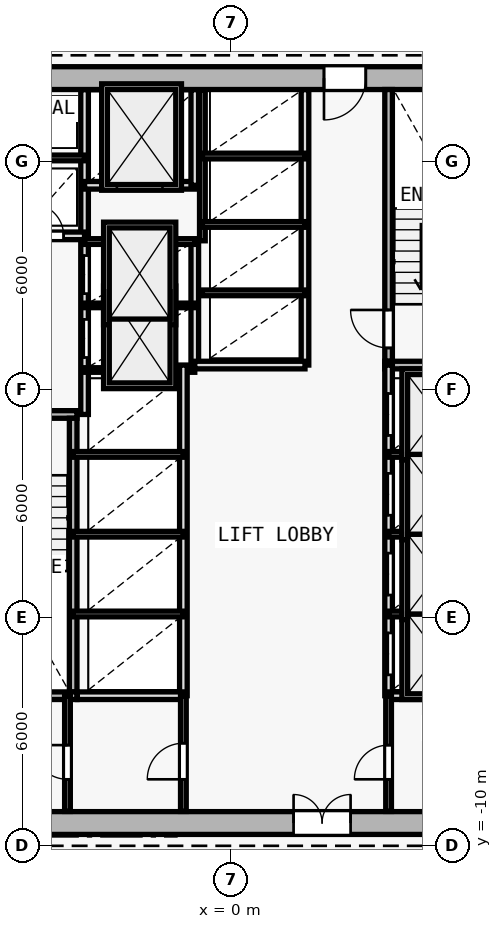
"""IFC4 building model, lengths in metres.
Left out: names, types, materials, properties, quantities, classifications, styles, units other than length and angle.
Written with IfcOpenShell. Run it as: python <this file> out.ifc"""

import sys

from ifc_helpers import new_model, si_unit, direction, frame, frame_2d, origin, origin_2d, place, context, subcontext, project, spatial, rectangle, i_section, extrude, element, fill, save


model = new_model("IFC4")
c1 = context("Model", 3, precision=1e-05, world=origin(), true_north=direction((0.0, 1.0)))
c2 = subcontext(c1, "Body", "Model", "MODEL_VIEW")
j1 = project(units=[si_unit("LENGTHUNIT", "METRE"), si_unit("PLANEANGLEUNIT", "RADIAN")], contexts=[c1])
p1 = place(None, origin())
s1 = spatial("IfcSite", under=j1, at=p1, CompositionType="ELEMENT")
p2 = place(p1, origin())
s2 = spatial("IfcBuilding", under=s1, at=p2, CompositionType="ELEMENT")
p3 = place(p2, frame((0.0, 0.0, 58.8)))
s3 = spatial("IfcBuildingStorey", under=s2, at=p3, CompositionType="ELEMENT", Elevation=58.8)
p4 = place(p3, frame((0.0, -9.4, 0.0), z_axis=(0.0, 0.0, 1.0), x_axis=(1.0, 0.0, 0.0)))
e1 = element("IfcColumn", 1, at=p4, inside=s3, PredefinedType="COLUMN", context=c2, shape_type="SweptSolid", body=[
    extrude(i_section(OverallWidth=0.416, OverallDepth=0.446, WebThickness=0.025, FlangeThickness=0.04, FilletRadius=0.015, at=origin_2d()), origin(), (0.0, 0.0, 1.0), 3.6),
])
p5 = place(p3, frame((-8.0, -9.4, 0.0), z_axis=(0.0, 0.0, 1.0), x_axis=(1.0, 0.0, 0.0)))
e2 = element("IfcWall", 2, at=p5, inside=s3, PredefinedType="SHEAR", context=c2, shape_type="SweptSolid", body=[
    extrude(rectangle(XDim=16.0, YDim=0.6, at=frame_2d((8.0, 0.0))), origin(), (0.0, 0.0, 1.0), 3.35),
])
p6 = place(p5, frame((9.65, 0.0, 0.0)))
e3 = element("IfcOpeningElement", 3, at=p6, cuts=e2, PredefinedType="OPENING", context=c2, shape_type="SweptSolid", body=[
    extrude(rectangle(XDim=1.5, YDim=2.2, at=frame_2d((0.75, 1.1))), frame((0.0, 0.31, 0.0), z_axis=(0.0, -1.0, 0.0), x_axis=(1.0, 0.0, 0.0)), (0.0, 0.0, 1.0), 0.62),
])
p7 = place(p3, frame((8.0, 10.2, 0.0), z_axis=(0.0, 0.0, 1.0), x_axis=(-1.0, 0.0, 0.0)))
e4 = element("IfcWall", 4, at=p7, inside=s3, PredefinedType="SHEAR", context=c2, shape_type="SweptSolid", body=[
    extrude(rectangle(XDim=16.0, YDim=0.6, at=frame_2d((8.0, 0.0))), origin(), (0.0, 0.0, 1.0), 3.35),
])
p8 = place(p7, frame((4.45, 0.0, 0.0)))
e5 = element("IfcOpeningElement", 5, at=p8, cuts=e4, PredefinedType="OPENING", context=c2, shape_type="SweptSolid", body=[
    extrude(rectangle(XDim=1.1, YDim=2.15, at=frame_2d((0.55, 1.075))), frame((0.0, 0.31, 0.0), z_axis=(0.0, -1.0, 0.0), x_axis=(1.0, 0.0, 0.0)), (0.0, 0.0, 1.0), 0.62),
])
p9 = place(p3, frame((-7.4, 1.35, 0.0), z_axis=(0.0, 0.0, 1.0), x_axis=(1.0, 0.0, 0.0)))
e6 = element("IfcWall", 6, at=p9, inside=s3, PredefinedType="SOLIDWALL", context=c2, shape_type="SweptSolid", body=[
    extrude(rectangle(XDim=3.35, YDim=0.2, at=frame_2d((1.675, 0.0))), origin(), (0.0, 0.0, 1.0), 3.35),
])
p10 = place(p9, frame((0.65, 0.0, 0.0)))
e7 = element("IfcOpeningElement", 7, at=p10, cuts=e6, PredefinedType="OPENING", context=c2, shape_type="SweptSolid", body=[
    extrude(rectangle(XDim=1.0, YDim=2.15, at=frame_2d((0.5, 1.075))), frame((0.0, 0.11, 0.0), z_axis=(0.0, -1.0, 0.0), x_axis=(1.0, 0.0, 0.0)), (0.0, 0.0, 1.0), 0.22),
])
p11 = place(p3, frame((-4.15, -5.95, 0.0), z_axis=(0.0, 0.0, 1.0), x_axis=(0.0, 1.0, 0.0)))
e8 = element("IfcWall", 8, at=p11, inside=s3, PredefinedType="SOLIDWALL", context=c2, shape_type="SweptSolid", body=[
    extrude(rectangle(XDim=7.2, YDim=0.2, at=frame_2d((3.6, 0.0))), origin(), (0.0, 0.0, 1.0), 3.35),
])
p12 = place(p3, frame((-3.85, 1.35, 0.0), z_axis=(0.0, 0.0, 1.0), x_axis=(0.0, 1.0, 0.0)))
e9 = element("IfcWall", 9, at=p12, inside=s3, PredefinedType="SOLIDWALL", context=c2, shape_type="SweptSolid", body=[
    extrude(rectangle(XDim=8.545, YDim=0.2, at=frame_2d((4.272, 0.0))), origin(), (0.0, 0.0, 1.0), 3.35),
])
p13 = place(p12, frame((1.5, 0.0, 0.0)))
e10 = element("IfcOpeningElement", 10, at=p13, cuts=e9, PredefinedType="OPENING", context=c2, shape_type="SweptSolid", body=[
    extrude(rectangle(XDim=1.0, YDim=2.15, at=frame_2d((0.5, 1.075))), frame((0.0, 0.11, 0.0), z_axis=(0.0, -1.0, 0.0), x_axis=(1.0, 0.0, 0.0)), (0.0, 0.0, 1.0), 0.22),
])
p14 = place(p12, frame((3.18, 0.0, 0.0)))
e11 = element("IfcOpeningElement", 11, at=p14, cuts=e9, PredefinedType="OPENING", context=c2, shape_type="SweptSolid", body=[
    extrude(rectangle(XDim=1.0, YDim=2.15, at=frame_2d((0.5, 1.075))), frame((0.0, 0.11, 0.0), z_axis=(0.0, -1.0, 0.0), x_axis=(1.0, 0.0, 0.0)), (0.0, 0.0, 1.0), 0.22),
])
p15 = place(p3, frame((-7.395, 6.05, 0.0), z_axis=(0.0, 0.0, 1.0), x_axis=(1.0, 0.0, 0.0)))
e12 = element("IfcWall", 12, at=p15, inside=s3, PredefinedType="SOLIDWALL", context=c2, shape_type="SweptSolid", body=[
    extrude(rectangle(XDim=3.545, YDim=0.2, at=frame_2d((1.772, 0.0))), origin(), (0.0, 0.0, 1.0), 3.35),
])
p16 = place(p15, frame((0.345, 0.0, 0.0)))
e13 = element("IfcOpeningElement", 13, at=p16, cuts=e12, PredefinedType="OPENING", context=c2, shape_type="SweptSolid", body=[
    extrude(rectangle(XDim=0.85, YDim=2.1, at=frame_2d((0.425, 1.05))), frame((0.0, 0.11, 0.0), z_axis=(0.0, -1.0, 0.0), x_axis=(1.0, 0.0, 0.0)), (0.0, 0.0, 1.0), 0.22),
])
p17 = place(p15, frame((2.145, 0.0, 0.0)))
e14 = element("IfcOpeningElement", 14, at=p17, cuts=e12, PredefinedType="OPENING", context=c2, shape_type="SweptSolid", body=[
    extrude(rectangle(XDim=0.85, YDim=2.1, at=frame_2d((0.425, 1.05))), frame((0.0, 0.11, 0.0), z_axis=(0.0, -1.0, 0.0), x_axis=(1.0, 0.0, 0.0)), (0.0, 0.0, 1.0), 0.22),
])
p18 = place(p3, frame((-7.395, 8.1, 0.0), z_axis=(0.0, 0.0, 1.0), x_axis=(1.0, 0.0, 0.0)))
e15 = element("IfcWall", 15, at=p18, inside=s3, PredefinedType="PARTITIONING", context=c2, shape_type="SweptSolid", body=[
    extrude(rectangle(XDim=3.545, YDim=0.15, at=frame_2d((1.772, 0.0))), origin(), (0.0, 0.0, 1.0), 3.35),
])
p19 = place(p3, frame((4.15, 2.75, 0.0), z_axis=(0.0, 0.0, 1.0), x_axis=(0.0, 1.0, 0.0)))
e16 = element("IfcWall", 16, at=p19, inside=s3, PredefinedType="SOLIDWALL", context=c2, shape_type="SweptSolid", body=[
    extrude(rectangle(XDim=7.15, YDim=0.2, at=frame_2d((3.575, 0.0))), origin(), (0.0, 0.0, 1.0), 3.35),
])
p20 = place(p19, frame((0.35, 0.0, 0.0)))
e17 = element("IfcOpeningElement", 17, at=p20, cuts=e16, PredefinedType="OPENING", context=c2, shape_type="SweptSolid", body=[
    extrude(rectangle(XDim=1.0, YDim=2.15, at=frame_2d((0.5, 1.075))), frame((0.0, 0.11, 0.0), z_axis=(0.0, -1.0, 0.0), x_axis=(1.0, 0.0, 0.0)), (0.0, 0.0, 1.0), 0.22),
])
p21 = place(p3, frame((4.05, 2.65, 0.0), z_axis=(0.0, 0.0, 1.0), x_axis=(1.0, 0.0, 0.0)))
e18 = element("IfcWall", 18, at=p21, inside=s3, PredefinedType="SOLIDWALL", context=c2, shape_type="SweptSolid", body=[
    extrude(rectangle(XDim=3.35, YDim=0.2, at=frame_2d((1.675, 0.0))), origin(), (0.0, 0.0, 1.0), 3.35),
])
p22 = place(p3, frame((-0.95, 2.65, 0.0), z_axis=(0.0, 0.0, 1.0), x_axis=(0.0, 1.0, 0.0)))
e19 = element("IfcWall", 19, at=p22, inside=s3, PredefinedType="SOLIDWALL", context=c2, shape_type="SweptSolid", body=[
    extrude(rectangle(XDim=3.27, YDim=0.2, at=frame_2d((1.635, 0.0))), origin(), (0.0, 0.0, 1.0), 3.35),
])
for number, where, z_axis, x_axis in (
    (20, (-3.85, 2.52, 0.0), (0.0, 0.0, 1.0), (1.0, 0.0, 0.0)),
    (21, (-3.85, 4.22, 0.0), (0.0, 0.0, 1.0), (1.0, 0.0, 0.0)),
):
    element("IfcWall", number, at=place(p3, frame(where, z_axis=z_axis, x_axis=x_axis)), inside=s3, PredefinedType="PARTITIONING", context=c2, shape_type="SweptSolid", body=[
        extrude(rectangle(XDim=2.9, YDim=0.12, at=frame_2d((1.45, 0.0))), origin(), (0.0, 0.0, 1.0), 3.35),
    ])
p23 = place(p3, frame((-3.85, 5.9, 0.0), z_axis=(0.0, 0.0, 1.0), x_axis=(1.0, 0.0, 0.0)))
e22 = element("IfcWall", 22, at=p23, inside=s3, PredefinedType="PARTITIONING", context=c2, shape_type="SweptSolid", body=[
    extrude(rectangle(XDim=2.9, YDim=0.15, at=frame_2d((1.45, 0.0))), origin(), (0.0, 0.0, 1.0), 3.35),
])
p24 = place(p3, frame((-3.85, 7.38, 0.0), z_axis=(0.0, 0.0, 1.0), x_axis=(1.0, 0.0, 0.0)))
e23 = element("IfcWall", 23, at=p24, inside=s3, PredefinedType="SOLIDWALL", context=c2, shape_type="SweptSolid", body=[
    extrude(rectangle(XDim=2.9, YDim=0.2, at=frame_2d((1.45, 0.0))), origin(), (0.0, 0.0, 1.0), 3.35),
])
p25 = place(p24, frame((0.85, 0.0, 0.0)))
e24 = element("IfcOpeningElement", 24, at=p25, cuts=e23, PredefinedType="OPENING", context=c2, shape_type="SweptSolid", body=[
    extrude(rectangle(XDim=1.2, YDim=2.2, at=frame_2d((0.6, 1.1))), frame((0.0, 0.11, 0.0), z_axis=(0.0, -1.0, 0.0), x_axis=(1.0, 0.0, 0.0)), (0.0, 0.0, 1.0), 0.22),
])
p26 = place(p3, frame((-0.95, 7.38, 0.0), z_axis=(0.0, 0.0, 1.0), x_axis=(0.0, 1.0, 0.0)))
e25 = element("IfcWall", 25, at=p26, inside=s3, PredefinedType="SOLIDWALL", context=c2, shape_type="SweptSolid", body=[
    extrude(rectangle(XDim=2.515, YDim=0.2, at=frame_2d((1.258, 0.0))), origin(), (0.0, 0.0, 1.0), 3.35),
])
p27 = place(p3, frame((4.15, -6.05, 0.0), z_axis=(0.0, 0.0, 1.0), x_axis=(0.0, 1.0, 0.0)))
e26 = element("IfcWall", 26, at=p27, inside=s3, PredefinedType="SOLIDWALL", context=c2, shape_type="SweptSolid", body=[
    extrude(rectangle(XDim=8.7, YDim=0.2, at=frame_2d((4.35, 0.0))), origin(), (0.0, 0.0, 1.0), 3.35),
])
p28 = place(p27, frame((0.55, 0.0, 0.0)))
e27 = element("IfcOpeningElement", 27, at=p28, cuts=e26, PredefinedType="OPENING", context=c2, shape_type="SweptSolid", body=[
    extrude(rectangle(XDim=1.1, YDim=2.15, at=frame_2d((0.55, 1.075))), frame((0.0, 0.11, 0.0), z_axis=(0.0, -1.0, 0.0), x_axis=(1.0, 0.0, 0.0)), (0.0, 0.0, 1.0), 0.22),
])
p29 = place(p27, frame((2.65, 0.0, 0.0)))
e28 = element("IfcOpeningElement", 28, at=p29, cuts=e26, PredefinedType="OPENING", context=c2, shape_type="SweptSolid", body=[
    extrude(rectangle(XDim=1.1, YDim=2.15, at=frame_2d((0.55, 1.075))), frame((0.0, 0.11, 0.0), z_axis=(0.0, -1.0, 0.0), x_axis=(1.0, 0.0, 0.0)), (0.0, 0.0, 1.0), 0.22),
])
p30 = place(p27, frame((4.75, 0.0, 0.0)))
e29 = element("IfcOpeningElement", 29, at=p30, cuts=e26, PredefinedType="OPENING", context=c2, shape_type="SweptSolid", body=[
    extrude(rectangle(XDim=1.1, YDim=2.15, at=frame_2d((0.55, 1.075))), frame((0.0, 0.11, 0.0), z_axis=(0.0, -1.0, 0.0), x_axis=(1.0, 0.0, 0.0)), (0.0, 0.0, 1.0), 0.22),
])
p31 = place(p27, frame((6.85, 0.0, 0.0)))
e30 = element("IfcOpeningElement", 30, at=p31, cuts=e26, PredefinedType="OPENING", context=c2, shape_type="SweptSolid", body=[
    extrude(rectangle(XDim=1.1, YDim=2.15, at=frame_2d((0.55, 1.075))), frame((0.0, 0.11, 0.0), z_axis=(0.0, -1.0, 0.0), x_axis=(1.0, 0.0, 0.0)), (0.0, 0.0, 1.0), 0.22),
])
for number, where, z_axis, x_axis in (
    (31, (4.15, -3.9, 0.0), (0.0, 0.0, 1.0), (1.0, 0.0, 0.0)),
    (32, (4.15, -1.8, 0.0), (0.0, 0.0, 1.0), (1.0, 0.0, 0.0)),
    (33, (4.15, 0.3, 0.0), (0.0, 0.0, 1.0), (1.0, 0.0, 0.0)),
):
    element("IfcWall", number, at=place(p3, frame(where, z_axis=z_axis, x_axis=x_axis)), inside=s3, PredefinedType="PARTITIONING", context=c2, shape_type="SweptSolid", body=[
        extrude(rectangle(XDim=2.6, YDim=0.15, at=frame_2d((1.3, 0.0))), origin(), (0.0, 0.0, 1.0), 3.35),
    ])
p32 = place(p3, frame((-1.25, -6.05, 0.0), z_axis=(0.0, 0.0, 1.0), x_axis=(0.0, 1.0, 0.0)))
e34 = element("IfcWall", 34, at=p32, inside=s3, PredefinedType="SOLIDWALL", context=c2, shape_type="SweptSolid", body=[
    extrude(rectangle(XDim=8.7, YDim=0.2, at=frame_2d((4.35, 0.0))), origin(), (0.0, 0.0, 1.0), 3.35),
])
for number, where, z_axis, x_axis in (
    (35, (-4.15, -3.9, 0.0), (0.0, 0.0, 1.0), (1.0, 0.0, 0.0)),
    (36, (-4.15, -1.8, 0.0), (0.0, 0.0, 1.0), (1.0, 0.0, 0.0)),
    (37, (-4.15, 0.3, 0.0), (0.0, 0.0, 1.0), (1.0, 0.0, 0.0)),
):
    element("IfcWall", number, at=place(p3, frame(where, z_axis=z_axis, x_axis=x_axis)), inside=s3, PredefinedType="PARTITIONING", context=c2, shape_type="SweptSolid", body=[
        extrude(rectangle(XDim=2.9, YDim=0.15, at=frame_2d((1.45, 0.0))), origin(), (0.0, 0.0, 1.0), 3.35),
    ])
p33 = place(p3, frame((1.95, 2.65, 0.0), z_axis=(0.0, 0.0, 1.0), x_axis=(0.0, 1.0, 0.0)))
e38 = element("IfcWall", 38, at=p33, inside=s3, PredefinedType="SOLIDWALL", context=c2, shape_type="SweptSolid", body=[
    extrude(rectangle(XDim=7.245, YDim=0.2, at=frame_2d((3.623, 0.0))), origin(), (0.0, 0.0, 1.0), 3.35),
])
p34 = place(p3, frame((-0.95, 2.65, 0.0), z_axis=(0.0, 0.0, 1.0), x_axis=(1.0, 0.0, 0.0)))
e39 = element("IfcWall", 39, at=p34, inside=s3, PredefinedType="SOLIDWALL", context=c2, shape_type="SweptSolid", body=[
    extrude(rectangle(XDim=2.9, YDim=0.2, at=frame_2d((1.45, 0.0))), origin(), (0.0, 0.0, 1.0), 3.35),
])
p35 = place(p3, frame((-0.75, 5.92, 0.0), z_axis=(0.0, 0.0, 1.0), x_axis=(0.0, 1.0, 0.0)))
e40 = element("IfcWall", 40, at=p35, inside=s3, PredefinedType="PARTITIONING", context=c2, shape_type="SweptSolid", body=[
    extrude(rectangle(XDim=3.975, YDim=0.15, at=frame_2d((1.988, 0.0))), origin(), (0.0, 0.0, 1.0), 3.35),
])
for number, where, z_axis, x_axis in (
    (41, (-0.75, 4.55, 0.0), (0.0, 0.0, 1.0), (1.0, 0.0, 0.0)),
    (42, (-0.75, 6.35, 0.0), (0.0, 0.0, 1.0), (1.0, 0.0, 0.0)),
    (43, (-0.75, 8.15, 0.0), (0.0, 0.0, 1.0), (1.0, 0.0, 0.0)),
):
    element("IfcWall", number, at=place(p3, frame(where, z_axis=z_axis, x_axis=x_axis)), inside=s3, PredefinedType="PARTITIONING", context=c2, shape_type="SweptSolid", body=[
        extrude(rectangle(XDim=2.7, YDim=0.15, at=frame_2d((1.35, 0.0))), origin(), (0.0, 0.0, 1.0), 3.35),
    ])
p36 = place(p3, frame((-7.4, -6.05, 0.0), z_axis=(0.0, 0.0, 1.0), x_axis=(1.0, 0.0, 0.0)))
e44 = element("IfcWall", 44, at=p36, inside=s3, PredefinedType="SOLIDWALL", context=c2, shape_type="SweptSolid", body=[
    extrude(rectangle(XDim=3.35, YDim=0.2, at=frame_2d((1.675, 0.0))), origin(), (0.0, 0.0, 1.0), 3.35),
])
p37 = place(p3, frame((-4.04, -6.05, 0.0), z_axis=(0.0, 0.0, 1.0), x_axis=(1.0, 0.0, 0.0)))
e45 = element("IfcWall", 45, at=p37, inside=s3, PredefinedType="SOLIDWALL", context=c2, shape_type="SweptSolid", body=[
    extrude(rectangle(XDim=2.79, YDim=0.2, at=frame_2d((1.395, 0.0))), origin(), (0.0, 0.0, 1.0), 3.35),
])
p38 = place(p3, frame((4.15, -6.05, 0.0), z_axis=(0.0, 0.0, 1.0), x_axis=(1.0, 0.0, 0.0)))
e46 = element("IfcWall", 46, at=p38, inside=s3, PredefinedType="SOLIDWALL", context=c2, shape_type="SweptSolid", body=[
    extrude(rectangle(XDim=3.245, YDim=0.2, at=frame_2d((1.623, 0.0))), origin(), (0.0, 0.0, 1.0), 3.35),
])
p39 = place(p3, frame((-1.25, -9.095, 0.0), z_axis=(0.0, 0.0, 1.0), x_axis=(0.0, 1.0, 0.0)))
e47 = element("IfcWall", 47, at=p39, inside=s3, PredefinedType="PARTITIONING", context=c2, shape_type="SweptSolid", body=[
    extrude(rectangle(XDim=3.045, YDim=0.15, at=frame_2d((1.522, 0.0))), origin(), (0.0, 0.0, 1.0), 3.35),
])
p40 = place(p39, frame((0.845, 0.0, 0.0)))
e48 = element("IfcOpeningElement", 48, at=p40, cuts=e47, PredefinedType="OPENING", context=c2, shape_type="SweptSolid", body=[
    extrude(rectangle(XDim=0.95, YDim=2.1, at=frame_2d((0.475, 1.05))), frame((0.0, 0.085, 0.0), z_axis=(0.0, -1.0, 0.0), x_axis=(1.0, 0.0, 0.0)), (0.0, 0.0, 1.0), 0.17),
])
p41 = place(p3, frame((4.15, -9.095, 0.0), z_axis=(0.0, 0.0, 1.0), x_axis=(0.0, 1.0, 0.0)))
e49 = element("IfcWall", 49, at=p41, inside=s3, PredefinedType="PARTITIONING", context=c2, shape_type="SweptSolid", body=[
    extrude(rectangle(XDim=3.045, YDim=0.15, at=frame_2d((1.522, 0.0))), origin(), (0.0, 0.0, 1.0), 3.35),
])
p42 = place(p41, frame((0.845, 0.0, 0.0)))
e50 = element("IfcOpeningElement", 50, at=p42, cuts=e49, PredefinedType="OPENING", context=c2, shape_type="SweptSolid", body=[
    extrude(rectangle(XDim=0.9, YDim=2.1, at=frame_2d((0.45, 1.05))), frame((0.0, 0.085, 0.0), z_axis=(0.0, -1.0, 0.0), x_axis=(1.0, 0.0, 0.0)), (0.0, 0.0, 1.0), 0.17),
])
p43 = place(p3, frame((-4.3, -9.095, 0.0), z_axis=(0.0, 0.0, 1.0), x_axis=(0.0, 1.0, 0.0)))
e51 = element("IfcWall", 51, at=p43, inside=s3, PredefinedType="PARTITIONING", context=c2, shape_type="SweptSolid", body=[
    extrude(rectangle(XDim=3.045, YDim=0.15, at=frame_2d((1.522, 0.0))), origin(), (0.0, 0.0, 1.0), 3.35),
])
p44 = place(p43, frame((0.845, 0.0, 0.0)))
e52 = element("IfcOpeningElement", 52, at=p44, cuts=e51, PredefinedType="OPENING", context=c2, shape_type="SweptSolid", body=[
    extrude(rectangle(XDim=0.9, YDim=2.1, at=frame_2d((0.45, 1.05))), frame((0.0, 0.085, 0.0), z_axis=(0.0, -1.0, 0.0), x_axis=(1.0, 0.0, 0.0)), (0.0, 0.0, 1.0), 0.17),
])
p45 = place(p6, origin())
e53 = element("IfcDoor", 53, at=p45, inside=s3, OperationType="DOUBLE_DOOR_SINGLE_SWING", PredefinedType="DOOR", context=c2, shape_type="SweptSolid", body=[
    extrude(rectangle(XDim=1.5, YDim=2.2, at=frame_2d((0.75, 1.1))), frame((0.0, 0.025, 0.0), z_axis=(0.0, -1.0, 0.0), x_axis=(1.0, 0.0, 0.0)), (0.0, 0.0, 1.0), 0.05),
])
fill(e3, e53)
p46 = place(p8, origin())
e54 = element("IfcDoor", 54, at=p46, inside=s3, OperationType="SINGLE_SWING_RIGHT", PredefinedType="DOOR", context=c2, shape_type="SweptSolid", body=[
    extrude(rectangle(XDim=1.1, YDim=2.15, at=frame_2d((0.55, 1.075))), frame((0.0, 0.025, 0.0), z_axis=(0.0, -1.0, 0.0), x_axis=(1.0, 0.0, 0.0)), (0.0, 0.0, 1.0), 0.05),
])
fill(e5, e54)
p47 = place(p17, origin())
e55 = element("IfcDoor", 55, at=p47, inside=s3, OperationType="SINGLE_SWING_LEFT", PredefinedType="DOOR", context=c2, shape_type="SweptSolid", body=[
    extrude(rectangle(XDim=0.85, YDim=2.1, at=frame_2d((0.425, 1.05))), frame((0.0, 0.025, 0.0), z_axis=(0.0, -1.0, 0.0), x_axis=(1.0, 0.0, 0.0)), (0.0, 0.0, 1.0), 0.05),
])
fill(e14, e55)
p48 = place(p20, origin())
e56 = element("IfcDoor", 56, at=p48, inside=s3, OperationType="SINGLE_SWING_RIGHT", PredefinedType="DOOR", context=c2, shape_type="SweptSolid", body=[
    extrude(rectangle(XDim=1.0, YDim=2.15, at=frame_2d((0.5, 1.075))), frame((0.0, 0.025, 0.0), z_axis=(0.0, -1.0, 0.0), x_axis=(1.0, 0.0, 0.0)), (0.0, 0.0, 1.0), 0.05),
])
fill(e17, e56)
p49 = place(p25, origin())
e57 = element("IfcDoor", 57, at=p49, inside=s3, OperationType="DOUBLE_DOOR_SLIDING", PredefinedType="DOOR", context=c2, shape_type="SweptSolid", body=[
    extrude(rectangle(XDim=1.2, YDim=2.2, at=frame_2d((0.6, 1.1))), frame((0.0, 0.025, 0.0), z_axis=(0.0, -1.0, 0.0), x_axis=(1.0, 0.0, 0.0)), (0.0, 0.0, 1.0), 0.05),
])
fill(e24, e57)
p50 = place(p28, origin())
e58 = element("IfcDoor", 58, at=p50, inside=s3, OperationType="DOUBLE_DOOR_SLIDING", PredefinedType="DOOR", context=c2, shape_type="SweptSolid", body=[
    extrude(rectangle(XDim=1.1, YDim=2.15, at=frame_2d((0.55, 1.075))), frame((0.0, 0.025, 0.0), z_axis=(0.0, -1.0, 0.0), x_axis=(1.0, 0.0, 0.0)), (0.0, 0.0, 1.0), 0.05),
])
fill(e27, e58)
p51 = place(p29, origin())
e59 = element("IfcDoor", 59, at=p51, inside=s3, OperationType="DOUBLE_DOOR_SLIDING", PredefinedType="DOOR", context=c2, shape_type="SweptSolid", body=[
    extrude(rectangle(XDim=1.1, YDim=2.15, at=frame_2d((0.55, 1.075))), frame((0.0, 0.025, 0.0), z_axis=(0.0, -1.0, 0.0), x_axis=(1.0, 0.0, 0.0)), (0.0, 0.0, 1.0), 0.05),
])
fill(e28, e59)
p52 = place(p30, origin())
e60 = element("IfcDoor", 60, at=p52, inside=s3, OperationType="DOUBLE_DOOR_SLIDING", PredefinedType="DOOR", context=c2, shape_type="SweptSolid", body=[
    extrude(rectangle(XDim=1.1, YDim=2.15, at=frame_2d((0.55, 1.075))), frame((0.0, 0.025, 0.0), z_axis=(0.0, -1.0, 0.0), x_axis=(1.0, 0.0, 0.0)), (0.0, 0.0, 1.0), 0.05),
])
fill(e29, e60)
p53 = place(p31, origin())
e61 = element("IfcDoor", 61, at=p53, inside=s3, OperationType="DOUBLE_DOOR_SLIDING", PredefinedType="DOOR", context=c2, shape_type="SweptSolid", body=[
    extrude(rectangle(XDim=1.1, YDim=2.15, at=frame_2d((0.55, 1.075))), frame((0.0, 0.025, 0.0), z_axis=(0.0, -1.0, 0.0), x_axis=(1.0, 0.0, 0.0)), (0.0, 0.0, 1.0), 0.05),
])
fill(e30, e61)
p54 = place(p13, origin())
e62 = element("IfcDoor", 62, at=p54, inside=s3, OperationType="DOUBLE_DOOR_SLIDING", PredefinedType="DOOR", context=c2, shape_type="SweptSolid", body=[
    extrude(rectangle(XDim=1.0, YDim=2.15, at=frame_2d((0.5, 1.075))), frame((0.0, 0.025, 0.0), z_axis=(0.0, -1.0, 0.0), x_axis=(1.0, 0.0, 0.0)), (0.0, 0.0, 1.0), 0.05),
])
fill(e10, e62)
p55 = place(p14, origin())
e63 = element("IfcDoor", 63, at=p55, inside=s3, OperationType="DOUBLE_DOOR_SLIDING", PredefinedType="DOOR", context=c2, shape_type="SweptSolid", body=[
    extrude(rectangle(XDim=1.0, YDim=2.15, at=frame_2d((0.5, 1.075))), frame((0.0, 0.025, 0.0), z_axis=(0.0, -1.0, 0.0), x_axis=(1.0, 0.0, 0.0)), (0.0, 0.0, 1.0), 0.05),
])
fill(e11, e63)
p56 = place(p40, origin())
e64 = element("IfcDoor", 64, at=p56, inside=s3, OperationType="SINGLE_SWING_LEFT", PredefinedType="DOOR", context=c2, shape_type="SweptSolid", body=[
    extrude(rectangle(XDim=0.95, YDim=2.1, at=frame_2d((0.475, 1.05))), frame((0.0, 0.025, 0.0), z_axis=(0.0, -1.0, 0.0), x_axis=(1.0, 0.0, 0.0)), (0.0, 0.0, 1.0), 0.05),
])
fill(e48, e64)
p57 = place(p44, origin())
e65 = element("IfcDoor", 65, at=p57, inside=s3, OperationType="SINGLE_SWING_RIGHT", PredefinedType="DOOR", context=c2, shape_type="SweptSolid", body=[
    extrude(rectangle(XDim=0.9, YDim=2.1, at=frame_2d((0.45, 1.05))), frame((0.0, 0.025, 0.0), z_axis=(0.0, -1.0, 0.0), x_axis=(1.0, 0.0, 0.0)), (0.0, 0.0, 1.0), 0.05),
])
fill(e52, e65)
p58 = place(p42, origin())
e66 = element("IfcDoor", 66, at=p58, inside=s3, OperationType="SINGLE_SWING_LEFT", PredefinedType="DOOR", context=c2, shape_type="SweptSolid", body=[
    extrude(rectangle(XDim=0.9, YDim=2.1, at=frame_2d((0.45, 1.05))), frame((0.0, 0.025, 0.0), z_axis=(0.0, -1.0, 0.0), x_axis=(1.0, 0.0, 0.0)), (0.0, 0.0, 1.0), 0.05),
])
fill(e50, e66)
save(model, sys.argv[1])
